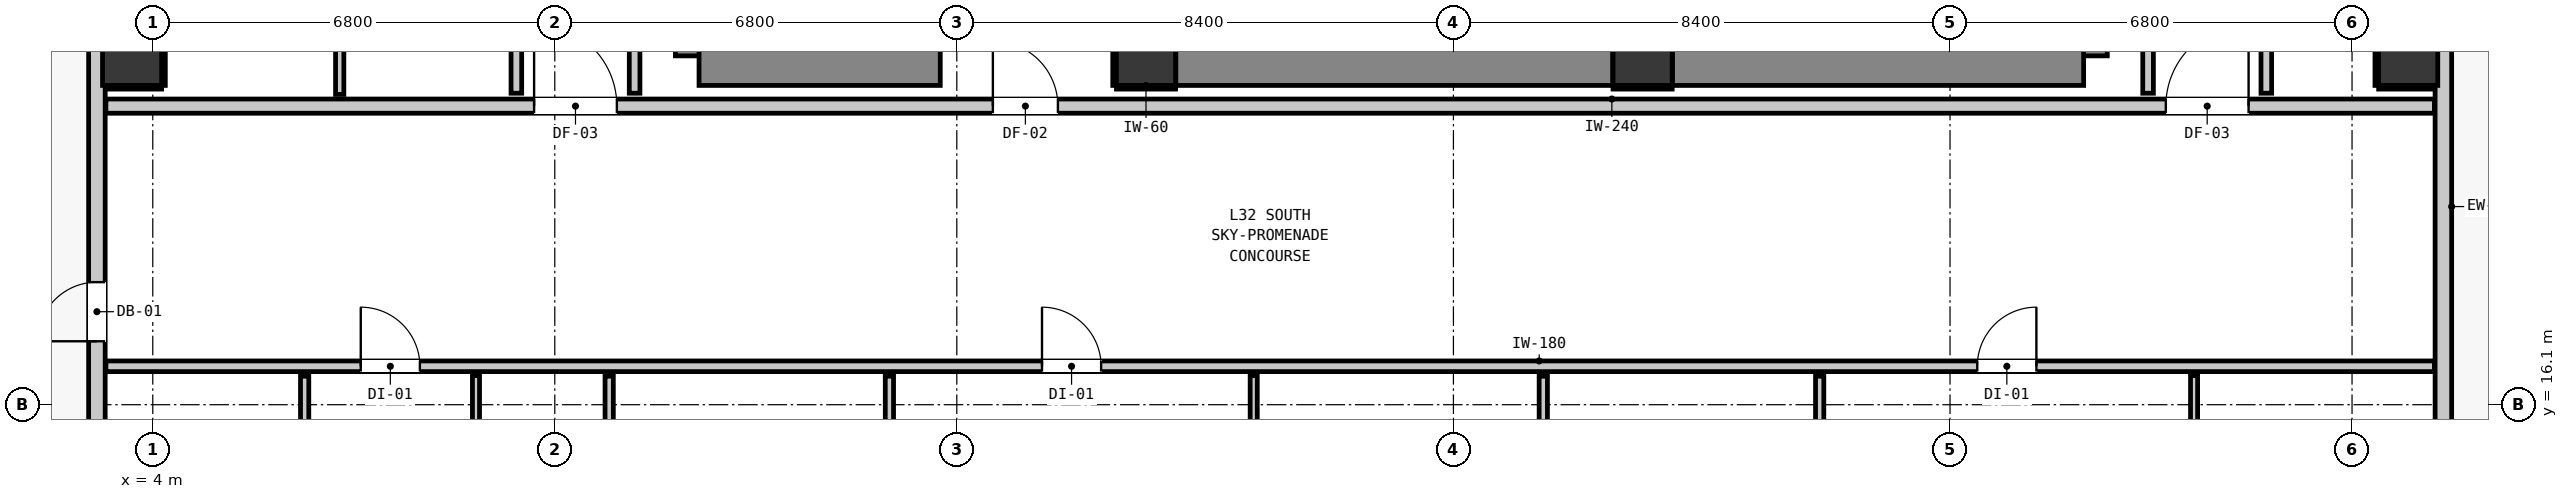
"""IFC4 building model, lengths in metres.
Left out: names, types, materials, properties, quantities, classifications, styles, units other than length and angle.
Written with IfcOpenShell. Run it as: python <this file> out.ifc"""

import sys

from ifc_helpers import new_model, si_unit, direction, frame, frame_2d, origin, origin_2d, place, context, subcontext, project, spatial, rectangle, extrude, element, fill, save


model = new_model("IFC4")
c1 = context("Model", 3, precision=1e-05, world=origin(), true_north=direction((0.0, 1.0)))
c2 = subcontext(c1, "Body", "Model", "MODEL_VIEW")
j1 = project(units=[si_unit("LENGTHUNIT", "METRE"), si_unit("PLANEANGLEUNIT", "RADIAN")], contexts=[c1])
p1 = place(None, origin())
s1 = spatial("IfcSite", under=j1, at=p1, CompositionType="ELEMENT")
p2 = place(p1, origin())
s2 = spatial("IfcBuilding", under=s1, at=p2, CompositionType="ELEMENT")
p3 = place(p2, frame((0.0, 0.0, 112.72)))
s3 = spatial("IfcBuildingStorey", under=s2, at=p3, CompositionType="ELEMENT", Elevation=112.72)
for number, where, z_axis, x_axis in (
    (1, (20.8, 22.0, 0.0), (0.0, 0.0, 1.0), (1.0, 0.0, 0.0)),
    (2, (29.2, 22.0, 0.0), (0.0, 0.0, 1.0), (1.0, 0.0, 0.0)),
):
    element("IfcColumn", number, at=place(p3, frame(where, z_axis=z_axis, x_axis=x_axis)), inside=s3, PredefinedType="COLUMN", context=c2, shape_type="SweptSolid", body=[
        extrude(rectangle(XDim=1.0, YDim=1.0, at=origin_2d()), origin(), (0.0, 0.0, 1.0), 3.32),
    ])
p4 = place(p3, frame((13.34, 22.0, 0.0), z_axis=(0.0, 0.0, 1.0), x_axis=(0.0, 1.0, 0.0)))
e3 = element("IfcWall", 3, at=p4, inside=s3, PredefinedType="SHEAR", context=c2, shape_type="SweptSolid", body=[
    extrude(rectangle(XDim=8.195, YDim=1.0, at=frame_2d((4.098, 0.0))), origin(), (0.0, 0.0, 1.0), 3.32),
])
p5 = place(p3, frame((13.24, 22.0, 0.0), z_axis=(0.0, 0.0, 1.0), x_axis=(1.0, 0.0, 0.0)))
e4 = element("IfcWall", 4, at=p5, inside=s3, PredefinedType="SHEAR", context=c2, shape_type="SweptSolid", body=[
    extrude(rectangle(XDim=4.08, YDim=1.0, at=frame_2d((2.04, 0.0))), origin(), (0.0, 0.0, 1.0), 3.32),
])
p6 = place(p3, frame((36.56, 22.0, 0.0), z_axis=(0.0, 0.0, 1.0), x_axis=(0.0, 1.0, 0.0)))
e5 = element("IfcWall", 5, at=p6, inside=s3, PredefinedType="SHEAR", context=c2, shape_type="SweptSolid", body=[
    extrude(rectangle(XDim=8.195, YDim=1.0, at=frame_2d((4.098, 0.0))), origin(), (0.0, 0.0, 1.0), 3.32),
])
p7 = place(p3, frame((29.705, 22.0, 0.0), z_axis=(0.0, 0.0, 1.0), x_axis=(1.0, 0.0, 0.0)))
e6 = element("IfcWall", 6, at=p7, inside=s3, PredefinedType="SHEAR", context=c2, shape_type="SweptSolid", body=[
    extrude(rectangle(XDim=6.955, YDim=1.0, at=frame_2d((3.478, 0.0))), origin(), (0.0, 0.0, 1.0), 3.32),
])
p8 = place(p3, frame((21.305, 22.0, 0.0), z_axis=(0.0, 0.0, 1.0), x_axis=(1.0, 0.0, 0.0)))
e7 = element("IfcWall", 7, at=p8, inside=s3, PredefinedType="SHEAR", context=c2, shape_type="SweptSolid", body=[
    extrude(rectangle(XDim=7.39, YDim=1.0, at=frame_2d((3.695, 0.0))), origin(), (0.0, 0.0, 1.0), 3.32),
])
for number, where, z_axis, x_axis in (
    (8, (3.65, 22.0, 0.0), (0.0, 0.0, 1.0), (1.0, 0.0, 0.0)),
    (9, (42.15, 22.0, 0.0), (0.0, 0.0, 1.0), (1.0, 0.0, 0.0)),
):
    element("IfcColumn", number, at=place(p3, frame(where, z_axis=z_axis, x_axis=x_axis)), inside=s3, PredefinedType="COLUMN", context=c2, shape_type="SweptSolid", body=[
        extrude(rectangle(XDim=1.0, YDim=1.0, at=origin_2d()), origin(), (0.0, 0.0, 1.0), 3.32),
    ])
p9 = place(p3, frame((3.055, 11.355, 0.0), z_axis=(0.0, 0.0, 1.0), x_axis=(0.0, 1.0, 0.0)))
e10 = element("IfcWall", 10, at=p9, inside=s3, PredefinedType="STANDARD", context=c2, shape_type="SweptSolid", body=[
    extrude(rectangle(XDim=32.29, YDim=0.28, at=frame_2d((16.145, 0.0))), origin(), (0.0, 0.0, 1.0), 3.08),
])
p10 = place(p9, frame((5.818, 0.0, 0.0)))
e11 = element("IfcOpeningElement", 11, at=p10, cuts=e10, PredefinedType="OPENING", context=c2, shape_type="SweptSolid", body=[
    extrude(rectangle(XDim=1.0, YDim=2.15, at=frame_2d((0.5, 1.075))), frame((0.0, 0.15, 0.0), z_axis=(0.0, -1.0, 0.0), x_axis=(1.0, 0.0, 0.0)), (0.0, 0.0, 1.0), 0.3),
])
p11 = place(p9, frame((0.395, 0.0, 0.85)))
e12 = element("IfcOpeningElement", 12, at=p11, cuts=e10, PredefinedType="OPENING", context=c2, shape_type="SweptSolid", body=[
    extrude(rectangle(XDim=1.35, YDim=1.85, at=frame_2d((0.675, 0.925))), frame((0.0, 0.15, 0.0), z_axis=(0.0, -1.0, 0.0), x_axis=(1.0, 0.0, 0.0)), (0.0, 0.0, 1.0), 0.3),
])
p12 = place(p9, frame((20.78, 0.0, 0.85)))
e13 = element("IfcOpeningElement", 13, at=p12, cuts=e10, PredefinedType="OPENING", context=c2, shape_type="SweptSolid", body=[
    extrude(rectangle(XDim=1.35, YDim=1.85, at=frame_2d((0.675, 0.925))), frame((0.0, 0.15, 0.0), z_axis=(0.0, -1.0, 0.0), x_axis=(1.0, 0.0, 0.0)), (0.0, 0.0, 1.0), 0.3),
])
p13 = place(p9, frame((12.61, 0.0, 0.85)))
e14 = element("IfcOpeningElement", 14, at=p13, cuts=e10, PredefinedType="OPENING", context=c2, shape_type="SweptSolid", body=[
    extrude(rectangle(XDim=1.35, YDim=1.85, at=frame_2d((0.675, 0.925))), frame((0.0, 0.15, 0.0), z_axis=(0.0, -1.0, 0.0), x_axis=(1.0, 0.0, 0.0)), (0.0, 0.0, 1.0), 0.3),
])
p14 = place(p9, frame((24.73, 0.0, 0.85)))
e15 = element("IfcOpeningElement", 15, at=p14, cuts=e10, PredefinedType="OPENING", context=c2, shape_type="SweptSolid", body=[
    extrude(rectangle(XDim=1.35, YDim=1.85, at=frame_2d((0.675, 0.925))), frame((0.0, 0.15, 0.0), z_axis=(0.0, -1.0, 0.0), x_axis=(1.0, 0.0, 0.0)), (0.0, 0.0, 1.0), 0.3),
])
p15 = place(p3, frame((42.745, 43.645, 0.0), z_axis=(0.0, 0.0, 1.0), x_axis=(0.0, -1.0, 0.0)))
e16 = element("IfcWall", 16, at=p15, inside=s3, PredefinedType="STANDARD", context=c2, shape_type="SweptSolid", body=[
    extrude(rectangle(XDim=32.29, YDim=0.28, at=frame_2d((16.145, 0.0))), origin(), (0.0, 0.0, 1.0), 3.08),
])
p16 = place(p15, frame((5.467, 0.0, 0.0)))
e17 = element("IfcOpeningElement", 17, at=p16, cuts=e16, PredefinedType="OPENING", context=c2, shape_type="SweptSolid", body=[
    extrude(rectangle(XDim=1.0, YDim=2.15, at=frame_2d((0.5, 1.075))), frame((0.0, 0.15, 0.0), z_axis=(0.0, -1.0, 0.0), x_axis=(1.0, 0.0, 0.0)), (0.0, 0.0, 1.0), 0.3),
])
p17 = place(p15, frame((0.318, 0.0, 0.85)))
e18 = element("IfcOpeningElement", 18, at=p17, cuts=e16, PredefinedType="OPENING", context=c2, shape_type="SweptSolid", body=[
    extrude(rectangle(XDim=1.05, YDim=1.65, at=frame_2d((0.525, 0.825))), frame((0.0, 0.15, 0.0), z_axis=(0.0, -1.0, 0.0), x_axis=(1.0, 0.0, 0.0)), (0.0, 0.0, 1.0), 0.3),
])
p18 = place(p15, frame((14.648, 0.0, 0.85)))
e19 = element("IfcOpeningElement", 19, at=p18, cuts=e16, PredefinedType="OPENING", context=c2, shape_type="SweptSolid", body=[
    extrude(rectangle(XDim=1.35, YDim=1.85, at=frame_2d((0.675, 0.925))), frame((0.0, 0.15, 0.0), z_axis=(0.0, -1.0, 0.0), x_axis=(1.0, 0.0, 0.0)), (0.0, 0.0, 1.0), 0.3),
])
p19 = place(p3, frame((3.207, 21.15, 0.0), z_axis=(0.0, 0.0, 1.0), x_axis=(1.0, 0.0, 0.0)))
e20 = element("IfcWall", 20, at=p19, inside=s3, PredefinedType="PARTITIONING", context=c2, shape_type="SweptSolid", body=[
    extrude(rectangle(XDim=39.386, YDim=0.24, at=frame_2d((19.693, 0.0))), origin(), (0.0, 0.0, 1.0), 3.08),
])
p20 = place(p19, frame((15.003, 0.0, 0.0)))
e21 = element("IfcOpeningElement", 21, at=p20, cuts=e20, PredefinedType="OPENING", context=c2, shape_type="SweptSolid", body=[
    extrude(rectangle(XDim=1.1, YDim=2.15, at=frame_2d((0.55, 1.075))), frame((0.0, 0.13, 0.0), z_axis=(0.0, -1.0, 0.0), x_axis=(1.0, 0.0, 0.0)), (0.0, 0.0, 1.0), 0.26),
])
p21 = place(p19, frame((7.243, 0.0, 0.0)))
e22 = element("IfcOpeningElement", 22, at=p21, cuts=e20, PredefinedType="OPENING", context=c2, shape_type="SweptSolid", body=[
    extrude(rectangle(XDim=1.4, YDim=2.15, at=frame_2d((0.7, 1.075))), frame((0.0, 0.13, 0.0), z_axis=(0.0, -1.0, 0.0), x_axis=(1.0, 0.0, 0.0)), (0.0, 0.0, 1.0), 0.26),
])
p22 = place(p19, frame((34.843, 0.0, 0.0)))
e23 = element("IfcOpeningElement", 23, at=p22, cuts=e20, PredefinedType="OPENING", context=c2, shape_type="SweptSolid", body=[
    extrude(rectangle(XDim=1.4, YDim=2.15, at=frame_2d((0.7, 1.075))), frame((0.0, 0.13, 0.0), z_axis=(0.0, -1.0, 0.0), x_axis=(1.0, 0.0, 0.0)), (0.0, 0.0, 1.0), 0.26),
])
p23 = place(p3, frame((3.207, 16.75, 0.0), z_axis=(0.0, 0.0, 1.0), x_axis=(1.0, 0.0, 0.0)))
e24 = element("IfcWall", 24, at=p23, inside=s3, PredefinedType="PARTITIONING", context=c2, shape_type="SweptSolid", body=[
    extrude(rectangle(XDim=39.386, YDim=0.18, at=frame_2d((19.693, 0.0))), origin(), (0.0, 0.0, 1.0), 3.08),
])
p24 = place(p23, frame((4.311, 0.0, 0.0)))
e25 = element("IfcOpeningElement", 25, at=p24, cuts=e24, PredefinedType="OPENING", context=c2, shape_type="SweptSolid", body=[
    extrude(rectangle(XDim=1.0, YDim=2.15, at=frame_2d((0.5, 1.075))), frame((0.0, 0.1, 0.0), z_axis=(0.0, -1.0, 0.0), x_axis=(1.0, 0.0, 0.0)), (0.0, 0.0, 1.0), 0.2),
])
p25 = place(p23, frame((15.834, 0.0, 0.0)))
e26 = element("IfcOpeningElement", 26, at=p25, cuts=e24, PredefinedType="OPENING", context=c2, shape_type="SweptSolid", body=[
    extrude(rectangle(XDim=1.0, YDim=2.15, at=frame_2d((0.5, 1.075))), frame((0.0, 0.1, 0.0), z_axis=(0.0, -1.0, 0.0), x_axis=(1.0, 0.0, 0.0)), (0.0, 0.0, 1.0), 0.2),
])
p26 = place(p23, frame((31.654, 0.0, 0.0)))
e27 = element("IfcOpeningElement", 27, at=p26, cuts=e24, PredefinedType="OPENING", context=c2, shape_type="SweptSolid", body=[
    extrude(rectangle(XDim=1.0, YDim=2.15, at=frame_2d((0.5, 1.075))), frame((0.0, 0.1, 0.0), z_axis=(0.0, -1.0, 0.0), x_axis=(1.0, 0.0, 0.0)), (0.0, 0.0, 1.0), 0.2),
])
p27 = place(p3, frame((10.15, 21.368, 0.0), z_axis=(0.0, 0.0, 1.0), x_axis=(0.0, 1.0, 0.0)))
e28 = element("IfcWall", 28, at=p27, inside=s3, PredefinedType="PARTITIONING", context=c2, shape_type="SweptSolid", body=[
    extrude(rectangle(XDim=5.354, YDim=0.18, at=frame_2d((2.677, 0.0))), origin(), (0.0, 0.0, 1.0), 3.08),
])
for number, where, z_axis, x_axis in (
    (29, (12.15, 21.368, 0.0), (0.0, 0.0, 1.0), (0.0, 1.0, 0.0)),
    (30, (37.75, 21.368, 0.0), (0.0, 0.0, 1.0), (0.0, 1.0, 0.0)),
):
    element("IfcWall", number, at=place(p3, frame(where, z_axis=z_axis, x_axis=x_axis)), inside=s3, PredefinedType="PARTITIONING", context=c2, shape_type="SweptSolid", body=[
        extrude(rectangle(XDim=18.694, YDim=0.18, at=frame_2d((9.347, 0.0))), origin(), (0.0, 0.0, 1.0), 3.08),
    ])
p28 = place(p3, frame((39.75, 21.368, 0.0), z_axis=(0.0, 0.0, 1.0), x_axis=(0.0, 1.0, 0.0)))
e31 = element("IfcWall", 31, at=p28, inside=s3, PredefinedType="PARTITIONING", context=c2, shape_type="SweptSolid", body=[
    extrude(rectangle(XDim=4.809, YDim=0.18, at=frame_2d((2.405, 0.0))), origin(), (0.0, 0.0, 1.0), 3.08),
])
p29 = place(p3, frame((6.569, 13.652, 0.0), z_axis=(0.0, 0.0, 1.0), x_axis=(0.0, 1.0, 0.0)))
e32 = element("IfcWall", 32, at=p29, inside=s3, PredefinedType="PARTITIONING", context=c2, shape_type="SweptSolid", body=[
    extrude(rectangle(XDim=2.93, YDim=0.14, at=frame_2d((1.465, 0.0))), origin(), (0.0, 0.0, 1.0), 3.08),
])
p30 = place(p29, frame((1.032, 0.0, 0.0)))
e33 = element("IfcOpeningElement", 33, at=p30, cuts=e32, PredefinedType="OPENING", context=c2, shape_type="SweptSolid", body=[
    extrude(rectangle(XDim=0.86, YDim=2.02, at=frame_2d((0.43, 1.01))), frame((0.0, 0.08, 0.0), z_axis=(0.0, -1.0, 0.0), x_axis=(1.0, 0.0, 0.0)), (0.0, 0.0, 1.0), 0.16),
])
p31 = place(p3, frame((7.162, 21.348, 0.0), z_axis=(0.0, 0.0, 1.0), x_axis=(0.0, 1.0, 0.0)))
e34 = element("IfcWall", 34, at=p31, inside=s3, PredefinedType="PARTITIONING", context=c2, shape_type="SweptSolid", body=[
    extrude(rectangle(XDim=5.394, YDim=0.14, at=frame_2d((2.697, 0.0))), origin(), (0.0, 0.0, 1.0), 3.08),
])
p32 = place(p3, frame((11.72, 13.652, 0.0), z_axis=(0.0, 0.0, 1.0), x_axis=(0.0, 1.0, 0.0)))
e35 = element("IfcWall", 35, at=p32, inside=s3, PredefinedType="PARTITIONING", context=c2, shape_type="SweptSolid", body=[
    extrude(rectangle(XDim=2.93, YDim=0.14, at=frame_2d((1.465, 0.0))), origin(), (0.0, 0.0, 1.0), 3.08),
])
p33 = place(p3, frame((16.46, 13.652, 0.0), z_axis=(0.0, 0.0, 1.0), x_axis=(0.0, 1.0, 0.0)))
e36 = element("IfcWall", 36, at=p33, inside=s3, PredefinedType="PARTITIONING", context=c2, shape_type="SweptSolid", body=[
    extrude(rectangle(XDim=2.93, YDim=0.14, at=frame_2d((1.465, 0.0))), origin(), (0.0, 0.0, 1.0), 3.08),
])
p34 = place(p33, frame((1.032, 0.0, 0.0)))
e37 = element("IfcOpeningElement", 37, at=p34, cuts=e36, PredefinedType="OPENING", context=c2, shape_type="SweptSolid", body=[
    extrude(rectangle(XDim=0.86, YDim=2.02, at=frame_2d((0.43, 1.01))), frame((0.0, 0.08, 0.0), z_axis=(0.0, -1.0, 0.0), x_axis=(1.0, 0.0, 0.0)), (0.0, 0.0, 1.0), 0.16),
])
p35 = place(p3, frame((27.52, 13.652, 0.0), z_axis=(0.0, 0.0, 1.0), x_axis=(0.0, 1.0, 0.0)))
e38 = element("IfcWall", 38, at=p35, inside=s3, PredefinedType="PARTITIONING", context=c2, shape_type="SweptSolid", body=[
    extrude(rectangle(XDim=2.93, YDim=0.14, at=frame_2d((1.465, 0.0))), origin(), (0.0, 0.0, 1.0), 3.08),
])
p36 = place(p3, frame((32.195, 13.652, 0.0), z_axis=(0.0, 0.0, 1.0), x_axis=(0.0, 1.0, 0.0)))
e39 = element("IfcWall", 39, at=p36, inside=s3, PredefinedType="PARTITIONING", context=c2, shape_type="SweptSolid", body=[
    extrude(rectangle(XDim=2.93, YDim=0.14, at=frame_2d((1.465, 0.0))), origin(), (0.0, 0.0, 1.0), 3.08),
])
p37 = place(p36, frame((1.032, 0.0, 0.0)))
e40 = element("IfcOpeningElement", 40, at=p37, cuts=e39, PredefinedType="OPENING", context=c2, shape_type="SweptSolid", body=[
    extrude(rectangle(XDim=0.86, YDim=2.02, at=frame_2d((0.43, 1.01))), frame((0.0, 0.08, 0.0), z_axis=(0.0, -1.0, 0.0), x_axis=(1.0, 0.0, 0.0)), (0.0, 0.0, 1.0), 0.16),
])
p38 = place(p3, frame((9.467, 9.207, 0.0), z_axis=(0.0, 0.0, 1.0), x_axis=(0.0, 1.0, 0.0)))
e41 = element("IfcWall", 41, at=p38, inside=s3, PredefinedType="PARTITIONING", context=c2, shape_type="SweptSolid", body=[
    extrude(rectangle(XDim=7.385, YDim=0.12, at=frame_2d((3.692, 0.0))), origin(), (0.0, 0.0, 1.0), 3.08),
])
p39 = place(p38, frame((3.318, 0.0, 0.0)))
e42 = element("IfcOpeningElement", 42, at=p39, cuts=e41, PredefinedType="OPENING", context=c2, shape_type="SweptSolid", body=[
    extrude(rectangle(XDim=0.9, YDim=2.1, at=frame_2d((0.45, 1.05))), frame((0.0, 0.07, 0.0), z_axis=(0.0, -1.0, 0.0), x_axis=(1.0, 0.0, 0.0)), (0.0, 0.0, 1.0), 0.14),
])
p40 = place(p3, frame((22.622, 13.642, 0.0), z_axis=(0.0, 0.0, 1.0), x_axis=(0.0, 1.0, 0.0)))
e43 = element("IfcWall", 43, at=p40, inside=s3, PredefinedType="PARTITIONING", context=c2, shape_type="SweptSolid", body=[
    extrude(rectangle(XDim=2.95, YDim=0.12, at=frame_2d((1.475, 0.0))), origin(), (0.0, 0.0, 1.0), 3.08),
])
p41 = place(p40, frame((1.022, 0.0, 0.0)))
e44 = element("IfcOpeningElement", 44, at=p41, cuts=e43, PredefinedType="OPENING", context=c2, shape_type="SweptSolid", body=[
    extrude(rectangle(XDim=0.9, YDim=2.1, at=frame_2d((0.45, 1.05))), frame((0.0, 0.07, 0.0), z_axis=(0.0, -1.0, 0.0), x_axis=(1.0, 0.0, 0.0)), (0.0, 0.0, 1.0), 0.14),
])
p42 = place(p3, frame((38.528, 10.101, 0.0), z_axis=(0.0, 0.0, 1.0), x_axis=(0.0, 1.0, 0.0)))
e45 = element("IfcWall", 45, at=p42, inside=s3, PredefinedType="PARTITIONING", context=c2, shape_type="SweptSolid", body=[
    extrude(rectangle(XDim=6.491, YDim=0.12, at=frame_2d((3.246, 0.0))), origin(), (0.0, 0.0, 1.0), 2.565),
])
p43 = place(p42, frame((2.424, 0.0, 0.0)))
e46 = element("IfcOpeningElement", 46, at=p43, cuts=e45, PredefinedType="OPENING", context=c2, shape_type="SweptSolid", body=[
    extrude(rectangle(XDim=0.9, YDim=2.1, at=frame_2d((0.45, 1.05))), frame((0.0, 0.07, 0.0), z_axis=(0.0, -1.0, 0.0), x_axis=(1.0, 0.0, 0.0)), (0.0, 0.0, 1.0), 0.14),
])
for number, where, z_axis, x_axis in (
    (47, (20.3, 21.468, 0.0), (0.0, 0.0, 1.0), (1.0, 0.0, 0.0)),
    (48, (20.268, 21.5, 0.0), (0.0, 0.0, 1.0), (0.0, 1.0, 0.0)),
    (49, (28.7, 21.468, 0.0), (0.0, 0.0, 1.0), (1.0, 0.0, 0.0)),
):
    element("IfcWall", number, at=place(p3, frame(where, z_axis=z_axis, x_axis=x_axis)), inside=s3, PredefinedType="PARTITIONING", context=c2, shape_type="SweptSolid", body=[
        extrude(rectangle(XDim=1.0, YDim=0.06, at=frame_2d((0.5, 0.0))), origin(), (0.0, 0.0, 1.0), 1.45),
    ])
p44 = place(p3, frame((3.21, 21.468, 0.0), z_axis=(0.0, 0.0, 1.0), x_axis=(1.0, 0.0, 0.0)))
e50 = element("IfcWall", 50, at=p44, inside=s3, PredefinedType="PARTITIONING", context=c2, shape_type="SweptSolid", body=[
    extrude(rectangle(XDim=0.94, YDim=0.06, at=frame_2d((0.47, 0.0))), origin(), (0.0, 0.0, 1.0), 1.45),
])
p45 = place(p3, frame((4.182, 21.5, 0.0), z_axis=(0.0, 0.0, 1.0), x_axis=(0.0, 1.0, 0.0)))
e51 = element("IfcWall", 51, at=p45, inside=s3, PredefinedType="PARTITIONING", context=c2, shape_type="SweptSolid", body=[
    extrude(rectangle(XDim=1.0, YDim=0.06, at=frame_2d((0.5, 0.0))), origin(), (0.0, 0.0, 1.0), 1.45),
])
p46 = place(p3, frame((41.65, 21.468, 0.0), z_axis=(0.0, 0.0, 1.0), x_axis=(1.0, 0.0, 0.0)))
e52 = element("IfcWall", 52, at=p46, inside=s3, PredefinedType="PARTITIONING", context=c2, shape_type="SweptSolid", body=[
    extrude(rectangle(XDim=0.94, YDim=0.06, at=frame_2d((0.47, 0.0))), origin(), (0.0, 0.0, 1.0), 1.45),
])
p47 = place(p3, frame((41.618, 21.5, 0.0), z_axis=(0.0, 0.0, 1.0), x_axis=(0.0, 1.0, 0.0)))
e53 = element("IfcWall", 53, at=p47, inside=s3, PredefinedType="PARTITIONING", context=c2, shape_type="SweptSolid", body=[
    extrude(rectangle(XDim=1.0, YDim=0.06, at=frame_2d((0.5, 0.0))), origin(), (0.0, 0.0, 1.0), 1.45),
])
p48 = place(p10, origin())
e54 = element("IfcDoor", 54, at=p48, inside=s3, OperationType="SINGLE_SWING_LEFT", PredefinedType="DOOR", context=c2, shape_type="SweptSolid", body=[
    extrude(rectangle(XDim=1.0, YDim=2.15, at=frame_2d((0.5, 1.075))), frame((0.0, 0.025, 0.0), z_axis=(0.0, -1.0, 0.0), x_axis=(1.0, 0.0, 0.0)), (0.0, 0.0, 1.0), 0.05),
])
fill(e11, e54)
p49 = place(p20, origin())
e55 = element("IfcDoor", 55, at=p49, inside=s3, OperationType="SINGLE_SWING_LEFT", PredefinedType="DOOR", context=c2, shape_type="SweptSolid", body=[
    extrude(rectangle(XDim=1.1, YDim=2.15, at=frame_2d((0.55, 1.075))), frame((0.0, 0.025, 0.0), z_axis=(0.0, -1.0, 0.0), x_axis=(1.0, 0.0, 0.0)), (0.0, 0.0, 1.0), 0.05),
])
fill(e21, e55)
p50 = place(p21, origin())
e56 = element("IfcDoor", 56, at=p50, inside=s3, OperationType="SINGLE_SWING_LEFT", PredefinedType="DOOR", context=c2, shape_type="SweptSolid", body=[
    extrude(rectangle(XDim=1.4, YDim=2.15, at=frame_2d((0.7, 1.075))), frame((0.0, 0.025, 0.0), z_axis=(0.0, -1.0, 0.0), x_axis=(1.0, 0.0, 0.0)), (0.0, 0.0, 1.0), 0.05),
])
fill(e22, e56)
p51 = place(p22, origin())
e57 = element("IfcDoor", 57, at=p51, inside=s3, OperationType="SINGLE_SWING_RIGHT", PredefinedType="DOOR", context=c2, shape_type="SweptSolid", body=[
    extrude(rectangle(XDim=1.4, YDim=2.15, at=frame_2d((0.7, 1.075))), frame((0.0, 0.025, 0.0), z_axis=(0.0, -1.0, 0.0), x_axis=(1.0, 0.0, 0.0)), (0.0, 0.0, 1.0), 0.05),
])
fill(e23, e57)
p52 = place(p24, origin())
e58 = element("IfcDoor", 58, at=p52, inside=s3, OperationType="SINGLE_SWING_LEFT", PredefinedType="DOOR", context=c2, shape_type="SweptSolid", body=[
    extrude(rectangle(XDim=1.0, YDim=2.15, at=frame_2d((0.5, 1.075))), frame((0.0, 0.025, 0.0), z_axis=(0.0, -1.0, 0.0), x_axis=(1.0, 0.0, 0.0)), (0.0, 0.0, 1.0), 0.05),
])
fill(e25, e58)
p53 = place(p25, origin())
e59 = element("IfcDoor", 59, at=p53, inside=s3, OperationType="SINGLE_SWING_LEFT", PredefinedType="DOOR", context=c2, shape_type="SweptSolid", body=[
    extrude(rectangle(XDim=1.0, YDim=2.15, at=frame_2d((0.5, 1.075))), frame((0.0, 0.025, 0.0), z_axis=(0.0, -1.0, 0.0), x_axis=(1.0, 0.0, 0.0)), (0.0, 0.0, 1.0), 0.05),
])
fill(e26, e59)
p54 = place(p26, origin())
e60 = element("IfcDoor", 60, at=p54, inside=s3, OperationType="SINGLE_SWING_RIGHT", PredefinedType="DOOR", context=c2, shape_type="SweptSolid", body=[
    extrude(rectangle(XDim=1.0, YDim=2.15, at=frame_2d((0.5, 1.075))), frame((0.0, 0.025, 0.0), z_axis=(0.0, -1.0, 0.0), x_axis=(1.0, 0.0, 0.0)), (0.0, 0.0, 1.0), 0.05),
])
fill(e27, e60)
save(model, sys.argv[1])
